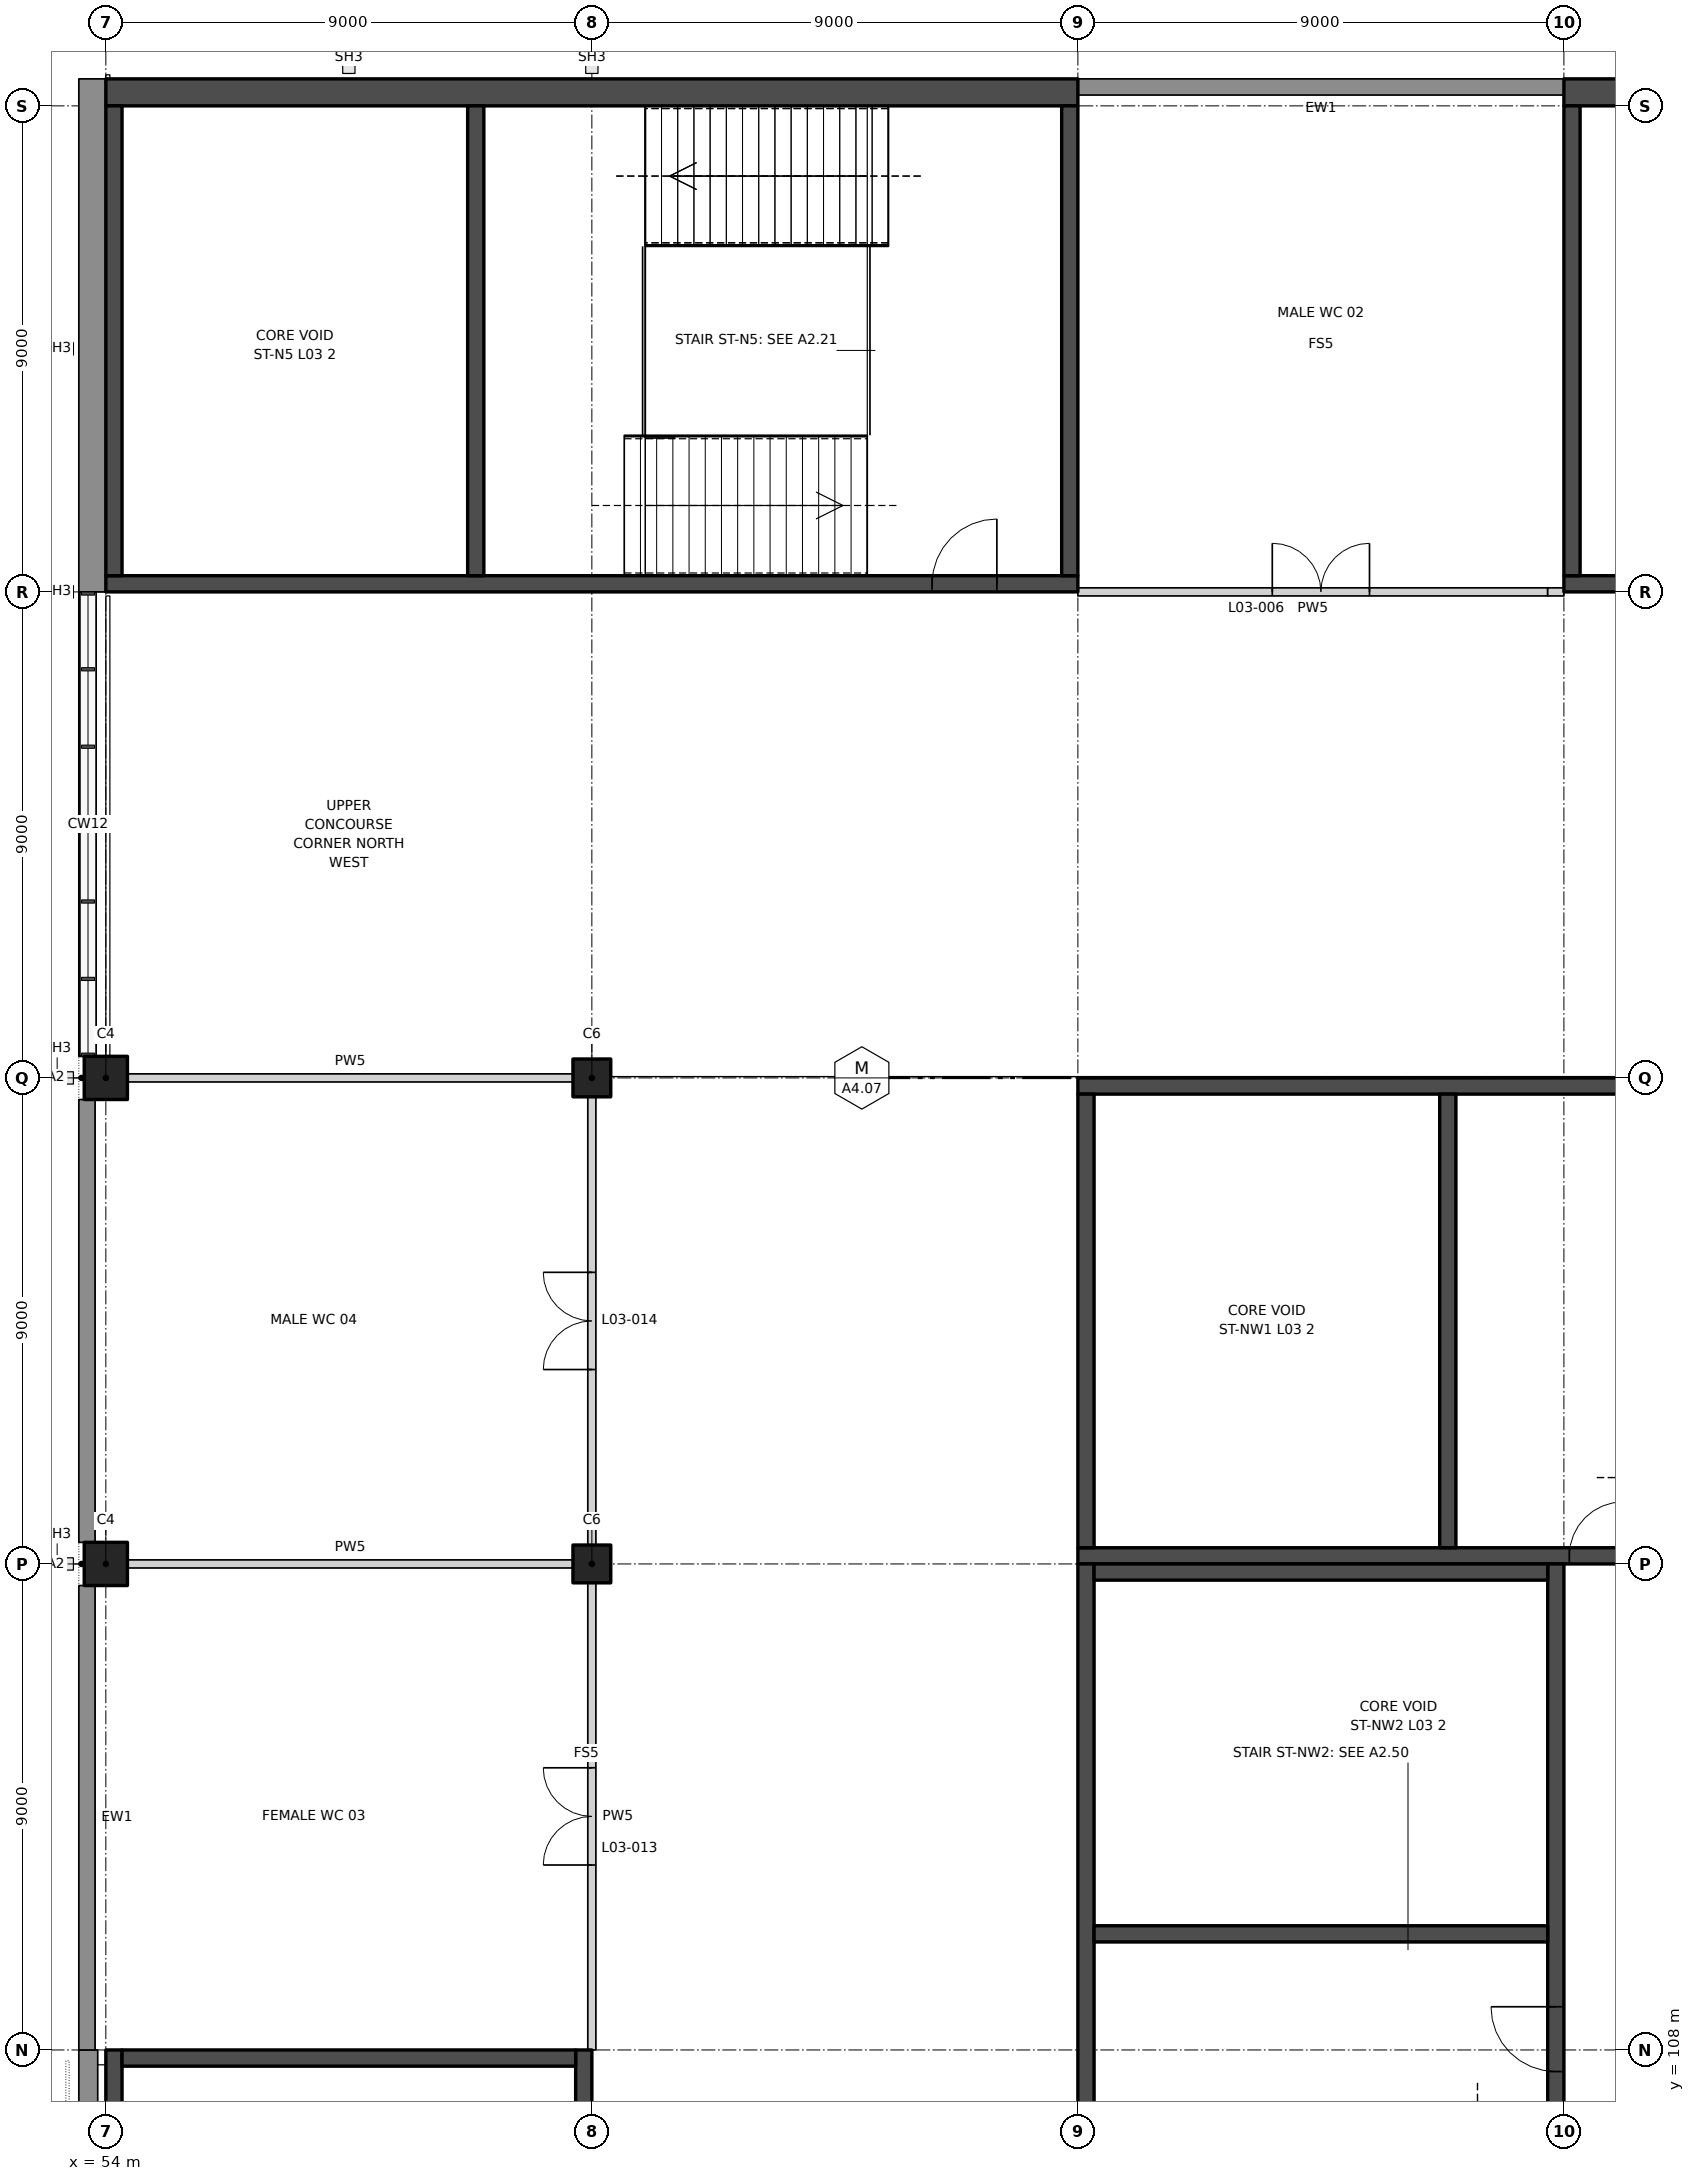
"""IFC4 building model, lengths in metres.
Left out: names, types, materials, properties, quantities, classifications, styles, units other than length and angle.
Written with IfcOpenShell. Run it as: python <this file> out.ifc"""

import sys

from ifc_helpers import new_model, si_unit, direction, frame, frame_2d, origin, origin_2d, place, context, subcontext, project, spatial, rectangle, extrude, element, fill, save


model = new_model("IFC4")
c1 = context("Model", 3, precision=1e-05, world=origin(), true_north=direction((0.0, 1.0)))
c2 = subcontext(c1, "Body", "Model", "MODEL_VIEW")
j1 = project(units=[si_unit("LENGTHUNIT", "METRE"), si_unit("PLANEANGLEUNIT", "RADIAN")], contexts=[c1])
p1 = place(None, origin())
s1 = spatial("IfcSite", under=j1, at=p1, CompositionType="ELEMENT")
p2 = place(p1, origin())
s2 = spatial("IfcBuilding", under=s1, at=p2, CompositionType="ELEMENT")
p3 = place(p2, frame((0.0, 0.0, 22.0)))
s3 = spatial("IfcBuildingStorey", under=s2, at=p3, CompositionType="ELEMENT", Elevation=22.0)
for number, where, z_axis, x_axis in (
    (1, (54.0, 117.0, 0.0), (0.0, 0.0, 1.0), (1.0, 0.0, 0.0)),
    (2, (54.0, 126.0, 0.0), (0.0, 0.0, 1.0), (1.0, 0.0, 0.0)),
):
    element("IfcColumn", number, at=place(p3, frame(where, z_axis=z_axis, x_axis=x_axis)), inside=s3, PredefinedType="COLUMN", context=c2, shape_type="SweptSolid", body=[
        extrude(rectangle(XDim=0.8, YDim=0.8, at=origin_2d()), origin(), (0.0, 0.0, 1.0), 6.0),
    ])
for number, where, z_axis, x_axis in (
    (3, (63.0, 117.0, 0.0), (0.0, 0.0, 1.0), (1.0, 0.0, 0.0)),
    (4, (63.0, 126.0, 0.0), (0.0, 0.0, 1.0), (1.0, 0.0, 0.0)),
):
    element("IfcColumn", number, at=place(p3, frame(where, z_axis=z_axis, x_axis=x_axis)), inside=s3, PredefinedType="COLUMN", context=c2, shape_type="SweptSolid", body=[
        extrude(rectangle(XDim=0.7, YDim=0.7, at=origin_2d()), origin(), (0.0, 0.0, 1.0), 6.0),
    ])
for number, where, z_axis, x_axis in (
    (5, (54.4, 117.0, 0.0), (0.0, 0.0, 1.0), (1.0, 0.0, 0.0)),
    (6, (54.4, 126.0, 0.0), (0.0, 0.0, 1.0), (1.0, 0.0, 0.0)),
):
    element("IfcWall", number, at=place(p3, frame(where, z_axis=z_axis, x_axis=x_axis)), inside=s3, PredefinedType="PARTITIONING", context=c2, shape_type="SweptSolid", body=[
        extrude(rectangle(XDim=8.25, YDim=0.15, at=frame_2d((4.125, 0.0))), origin(), (0.0, 0.0, 1.0), 4.8),
    ])
p4 = place(p3, frame((72.0, 135.0, 0.0), z_axis=(0.0, 0.0, 1.0), x_axis=(1.0, 0.0, 0.0)))
e7 = element("IfcWall", 7, at=p4, inside=s3, PredefinedType="PARTITIONING", context=c2, shape_type="SweptSolid", body=[
    extrude(rectangle(XDim=8.7, YDim=0.15, at=frame_2d((4.35, 0.0))), origin(), (0.0, 0.0, 1.0), 4.7),
])
p5 = place(p4, frame((3.6, 0.0, 0.0)))
e8 = element("IfcOpeningElement", 8, at=p5, cuts=e7, PredefinedType="OPENING", context=c2, shape_type="SweptSolid", body=[
    extrude(rectangle(XDim=1.8, YDim=2.1, at=frame_2d((0.9, 1.05))), frame((0.0, 0.085, 0.0), z_axis=(0.0, -1.0, 0.0), x_axis=(1.0, 0.0, 0.0)), (0.0, 0.0, 1.0), 0.17),
])
p6 = place(p3, frame((63.0, 108.0, 0.0), z_axis=(0.0, 0.0, 1.0), x_axis=(0.0, 1.0, 0.0)))
e9 = element("IfcWall", 9, at=p6, inside=s3, PredefinedType="PARTITIONING", context=c2, shape_type="SweptSolid", body=[
    extrude(rectangle(XDim=8.65, YDim=0.15, at=frame_2d((4.325, 0.0))), origin(), (0.0, 0.0, 1.0), 4.7),
])
p7 = place(p6, frame((3.425, 0.0, 0.0)))
e10 = element("IfcOpeningElement", 10, at=p7, cuts=e9, PredefinedType="OPENING", context=c2, shape_type="SweptSolid", body=[
    extrude(rectangle(XDim=1.8, YDim=2.1, at=frame_2d((0.9, 1.05))), frame((0.0, 0.085, 0.0), z_axis=(0.0, -1.0, 0.0), x_axis=(1.0, 0.0, 0.0)), (0.0, 0.0, 1.0), 0.17),
])
p8 = place(p3, frame((63.0, 117.35, 0.0), z_axis=(0.0, 0.0, 1.0), x_axis=(0.0, 1.0, 0.0)))
e11 = element("IfcWall", 11, at=p8, inside=s3, PredefinedType="PARTITIONING", context=c2, shape_type="SweptSolid", body=[
    extrude(rectangle(XDim=8.3, YDim=0.15, at=frame_2d((4.15, 0.0))), origin(), (0.0, 0.0, 1.0), 4.8),
])
p9 = place(p8, frame((3.25, 0.0, 0.0)))
e12 = element("IfcOpeningElement", 12, at=p9, cuts=e11, PredefinedType="OPENING", context=c2, shape_type="SweptSolid", body=[
    extrude(rectangle(XDim=1.8, YDim=2.1, at=frame_2d((0.9, 1.05))), frame((0.0, 0.085, 0.0), z_axis=(0.0, -1.0, 0.0), x_axis=(1.0, 0.0, 0.0)), (0.0, 0.0, 1.0), 0.17),
])
p10 = place(p3, frame((81.0, 144.35, 0.0), z_axis=(0.0, 0.0, 1.0), x_axis=(-1.0, 0.0, 0.0)))
e13 = element("IfcWall", 13, at=p10, inside=s3, PredefinedType="SOLIDWALL", context=c2, shape_type="SweptSolid", body=[
    extrude(rectangle(XDim=9.0, YDim=0.3, at=frame_2d((4.5, 0.0))), origin(), (0.0, 0.0, 1.0), 6.0),
])
p11 = place(p3, frame((53.675, 108.0, 0.0), z_axis=(0.0, 0.0, 1.0), x_axis=(0.0, -1.0, 0.0)))
e14 = element("IfcWall", 14, at=p11, inside=s3, PredefinedType="SOLIDWALL", context=c2, shape_type="SweptSolid", body=[
    extrude(rectangle(XDim=9.0, YDim=0.35, at=frame_2d((4.5, 0.0))), origin(), (0.0, 0.0, 1.0), 6.0),
])
p12 = place(p3, frame((53.65, 116.6, 0.0), z_axis=(0.0, 0.0, 1.0), x_axis=(0.0, -1.0, 0.0)))
e15 = element("IfcWall", 15, at=p12, inside=s3, PredefinedType="SOLIDWALL", context=c2, shape_type="SweptSolid", body=[
    extrude(rectangle(XDim=8.6, YDim=0.3, at=frame_2d((4.3, 0.0))), origin(), (0.0, 0.0, 1.0), 6.0),
])
p13 = place(p3, frame((53.65, 125.6, 0.0), z_axis=(0.0, 0.0, 1.0), x_axis=(0.0, -1.0, 0.0)))
e16 = element("IfcWall", 16, at=p13, inside=s3, PredefinedType="SOLIDWALL", context=c2, shape_type="SweptSolid", body=[
    extrude(rectangle(XDim=8.2, YDim=0.3, at=frame_2d((4.1, 0.0))), origin(), (0.0, 0.0, 1.0), 6.0),
])
p14 = place(p3, frame((53.65, 135.0, 0.0), z_axis=(0.0, 0.0, 1.0), x_axis=(0.0, -1.0, 0.0)))
e17 = element("IfcWall", 17, at=p14, inside=s3, PredefinedType="SOLIDWALL", context=c2, shape_type="SweptSolid", body=[
    extrude(rectangle(XDim=8.6, YDim=0.3, at=frame_2d((4.3, 0.0))), origin(), (0.0, 0.0, 1.0), 1.0),
])
p15 = place(p3, frame((53.75, 144.5, 0.0), z_axis=(0.0, 0.0, 1.0), x_axis=(0.0, -1.0, 0.0)))
e18 = element("IfcWall", 18, at=p15, inside=s3, PredefinedType="SOLIDWALL", context=c2, shape_type="SweptSolid", body=[
    extrude(rectangle(XDim=9.5, YDim=0.5, at=frame_2d((4.75, 0.0))), origin(), (0.0, 0.0, 1.0), 6.0),
])
p16 = place(p3, frame((81.0, 135.15, 0.0), z_axis=(0.0, 0.0, 1.0), x_axis=(1.0, 0.0, 0.0)))
e19 = element("IfcWall", 19, at=p16, inside=s3, PredefinedType="SHEAR", context=c2, shape_type="SweptSolid", body=[
    extrude(rectangle(XDim=18.0, YDim=0.3, at=frame_2d((9.0, 0.0))), origin(), (0.0, 0.0, 1.0), 6.0),
])
p17 = place(p16, frame((1.5, 0.0, 0.0)))
e20 = element("IfcOpeningElement", 20, at=p17, cuts=e19, PredefinedType="OPENING", context=c2, shape_type="SweptSolid", body=[
    extrude(rectangle(XDim=1.2, YDim=2.1, at=frame_2d((0.6, 1.05))), frame((0.0, 0.16, 0.0), z_axis=(0.0, -1.0, 0.0), x_axis=(1.0, 0.0, 0.0)), (0.0, 0.0, 1.0), 0.32),
])
p18 = place(p3, frame((81.0, 144.25, 0.0), z_axis=(0.0, 0.0, 1.0), x_axis=(1.0, 0.0, 0.0)))
e21 = element("IfcWall", 21, at=p18, inside=s3, PredefinedType="SHEAR", context=c2, shape_type="SweptSolid", body=[
    extrude(rectangle(XDim=18.0, YDim=0.5, at=frame_2d((9.0, 0.0))), origin(), (0.0, 0.0, 1.0), 6.0),
])
p19 = place(p3, frame((81.15, 135.3, 0.0), z_axis=(0.0, 0.0, 1.0), x_axis=(0.0, 1.0, 0.0)))
e22 = element("IfcWall", 22, at=p19, inside=s3, PredefinedType="SHEAR", context=c2, shape_type="SweptSolid", body=[
    extrude(rectangle(XDim=8.7, YDim=0.3, at=frame_2d((4.35, 0.0))), origin(), (0.0, 0.0, 1.0), 6.0),
])
p20 = place(p3, frame((72.0, 135.15, 0.0), z_axis=(0.0, 0.0, 1.0), x_axis=(-1.0, 0.0, 0.0)))
e23 = element("IfcWall", 23, at=p20, inside=s3, PredefinedType="SHEAR", context=c2, shape_type="SweptSolid", body=[
    extrude(rectangle(XDim=18.0, YDim=0.3, at=frame_2d((9.0, 0.0))), origin(), (0.0, 0.0, 1.0), 6.0),
])
p21 = place(p20, frame((1.5, 0.0, 0.0)))
e24 = element("IfcOpeningElement", 24, at=p21, cuts=e23, PredefinedType="OPENING", context=c2, shape_type="SweptSolid", body=[
    extrude(rectangle(XDim=1.2, YDim=2.1, at=frame_2d((0.6, 1.05))), frame((0.0, 0.16, 0.0), z_axis=(0.0, -1.0, 0.0), x_axis=(1.0, 0.0, 0.0)), (0.0, 0.0, 1.0), 0.32),
])
p22 = place(p3, frame((72.0, 144.25, 0.0), z_axis=(0.0, 0.0, 1.0), x_axis=(-1.0, 0.0, 0.0)))
e25 = element("IfcWall", 25, at=p22, inside=s3, PredefinedType="SHEAR", context=c2, shape_type="SweptSolid", body=[
    extrude(rectangle(XDim=18.0, YDim=0.5, at=frame_2d((9.0, 0.0))), origin(), (0.0, 0.0, 1.0), 6.0),
])
for number, where, z_axis, x_axis in (
    (26, (71.85, 135.3, 0.0), (0.0, 0.0, 1.0), (0.0, 1.0, 0.0)),
    (27, (54.15, 135.3, 0.0), (0.0, 0.0, 1.0), (0.0, 1.0, 0.0)),
    (28, (60.85, 135.3, 0.0), (0.0, 0.0, 1.0), (0.0, 1.0, 0.0)),
):
    element("IfcWall", number, at=place(p3, frame(where, z_axis=z_axis, x_axis=x_axis)), inside=s3, PredefinedType="SHEAR", context=c2, shape_type="SweptSolid", body=[
        extrude(rectangle(XDim=8.7, YDim=0.3, at=frame_2d((4.35, 0.0))), origin(), (0.0, 0.0, 1.0), 6.0),
    ])
p23 = place(p3, frame((62.85, 108.0, 0.0), z_axis=(0.0, 0.0, 1.0), x_axis=(0.0, -1.0, 0.0)))
e29 = element("IfcWall", 29, at=p23, inside=s3, PredefinedType="SHEAR", context=c2, shape_type="SweptSolid", body=[
    extrude(rectangle(XDim=18.0, YDim=0.3, at=frame_2d((9.0, 0.0))), origin(), (0.0, 0.0, 1.0), 6.0),
])
p24 = place(p23, frame((8.6, 0.0, 0.0)))
e30 = element("IfcOpeningElement", 30, at=p24, cuts=e29, PredefinedType="OPENING", context=c2, shape_type="SweptSolid", body=[
    extrude(rectangle(XDim=1.2, YDim=2.1, at=frame_2d((0.6, 1.05))), frame((0.0, 0.16, 0.0), z_axis=(0.0, -1.0, 0.0), x_axis=(1.0, 0.0, 0.0)), (0.0, 0.0, 1.0), 0.32),
])
p25 = place(p3, frame((54.15, 108.0, 0.0), z_axis=(0.0, 0.0, 1.0), x_axis=(0.0, -1.0, 0.0)))
e31 = element("IfcWall", 31, at=p25, inside=s3, PredefinedType="SHEAR", context=c2, shape_type="SweptSolid", body=[
    extrude(rectangle(XDim=18.0, YDim=0.3, at=frame_2d((9.0, 0.0))), origin(), (0.0, 0.0, 1.0), 6.0),
])
p26 = place(p3, frame((62.7, 107.85, 0.0), z_axis=(0.0, 0.0, 1.0), x_axis=(-1.0, 0.0, 0.0)))
e32 = element("IfcWall", 32, at=p26, inside=s3, PredefinedType="SHEAR", context=c2, shape_type="SweptSolid", body=[
    extrude(rectangle(XDim=8.4, YDim=0.3, at=frame_2d((4.2, 0.0))), origin(), (0.0, 0.0, 1.0), 6.0),
])
p27 = place(p3, frame((90.25, 117.15, 0.0), z_axis=(0.0, 0.0, 1.0), x_axis=(-1.0, 0.0, 0.0)))
e33 = element("IfcWall", 33, at=p27, inside=s3, PredefinedType="SHEAR", context=c2, shape_type="SweptSolid", body=[
    extrude(rectangle(XDim=18.25, YDim=0.3, at=frame_2d((9.125, 0.0))), origin(), (0.0, 0.0, 1.0), 6.0),
])
p28 = place(p27, frame((8.15, 0.0, 0.0)))
e34 = element("IfcOpeningElement", 34, at=p28, cuts=e33, PredefinedType="OPENING", context=c2, shape_type="SweptSolid", body=[
    extrude(rectangle(XDim=1.0, YDim=2.1, at=frame_2d((0.5, 1.05))), frame((0.0, 0.16, 0.0), z_axis=(0.0, -1.0, 0.0), x_axis=(1.0, 0.0, 0.0)), (0.0, 0.0, 1.0), 0.32),
])
p29 = place(p3, frame((90.0, 125.85, 0.0), z_axis=(0.0, 0.0, 1.0), x_axis=(-1.0, 0.0, 0.0)))
e35 = element("IfcWall", 35, at=p29, inside=s3, PredefinedType="SHEAR", context=c2, shape_type="SweptSolid", body=[
    extrude(rectangle(XDim=18.0, YDim=0.3, at=frame_2d((9.0, 0.0))), origin(), (0.0, 0.0, 1.0), 6.0),
])
for number, where, z_axis, x_axis in (
    (36, (72.15, 117.3, 0.0), (0.0, 0.0, 1.0), (0.0, 1.0, 0.0)),
    (37, (78.85, 117.3, 0.0), (0.0, 0.0, 1.0), (0.0, 1.0, 0.0)),
):
    element("IfcWall", number, at=place(p3, frame(where, z_axis=z_axis, x_axis=x_axis)), inside=s3, PredefinedType="SHEAR", context=c2, shape_type="SweptSolid", body=[
        extrude(rectangle(XDim=8.4, YDim=0.3, at=frame_2d((4.2, 0.0))), origin(), (0.0, 0.0, 1.0), 6.0),
    ])
p30 = place(p3, frame((80.85, 99.0, 0.0), z_axis=(0.0, 0.0, 1.0), x_axis=(0.0, 1.0, 0.0)))
e38 = element("IfcWall", 38, at=p30, inside=s3, PredefinedType="SHEAR", context=c2, shape_type="SweptSolid", body=[
    extrude(rectangle(XDim=18.0, YDim=0.3, at=frame_2d((9.0, 0.0))), origin(), (0.0, 0.0, 1.0), 6.0),
])
p31 = place(p30, frame((8.6, 0.0, 0.0)))
e39 = element("IfcOpeningElement", 39, at=p31, cuts=e38, PredefinedType="OPENING", context=c2, shape_type="SweptSolid", body=[
    extrude(rectangle(XDim=1.2, YDim=2.1, at=frame_2d((0.6, 1.05))), frame((0.0, 0.16, 0.0), z_axis=(0.0, -1.0, 0.0), x_axis=(1.0, 0.0, 0.0)), (0.0, 0.0, 1.0), 0.32),
])
p32 = place(p3, frame((72.15, 99.0, 0.0), z_axis=(0.0, 0.0, 1.0), x_axis=(0.0, 1.0, 0.0)))
e40 = element("IfcWall", 40, at=p32, inside=s3, PredefinedType="SHEAR", context=c2, shape_type="SweptSolid", body=[
    extrude(rectangle(XDim=18.0, YDim=0.3, at=frame_2d((9.0, 0.0))), origin(), (0.0, 0.0, 1.0), 6.0),
])
for number, where, z_axis, x_axis in (
    (41, (80.7, 116.85, 0.0), (0.0, 0.0, 1.0), (-1.0, 0.0, 0.0)),
    (42, (80.7, 110.15, 0.0), (0.0, 0.0, 1.0), (-1.0, 0.0, 0.0)),
):
    element("IfcWall", number, at=place(p3, frame(where, z_axis=z_axis, x_axis=x_axis)), inside=s3, PredefinedType="SHEAR", context=c2, shape_type="SweptSolid", body=[
        extrude(rectangle(XDim=8.4, YDim=0.3, at=frame_2d((4.2, 0.0))), origin(), (0.0, 0.0, 1.0), 6.0),
    ])
p33 = place(p3, frame((80.7, 135.0, 0.0), z_axis=(0.0, 0.0, 1.0), x_axis=(1.0, 0.0, 0.0)))
e43 = element("IfcWall", 43, at=p33, inside=s3, PredefinedType="PARTITIONING", context=c2, shape_type="SweptSolid", body=[
    extrude(rectangle(XDim=0.3, YDim=0.15, at=frame_2d((0.15, 0.0))), origin(), (0.0, 0.0, 1.0), 6.0),
])
p34 = place(p5, origin())
e44 = element("IfcDoor", 44, at=p34, inside=s3, OperationType="DOUBLE_DOOR_DOUBLE_SWING", PredefinedType="DOOR", context=c2, shape_type="SweptSolid", body=[
    extrude(rectangle(XDim=1.8, YDim=2.1, at=frame_2d((0.9, 1.05))), frame((0.0, 0.025, 0.0), z_axis=(0.0, -1.0, 0.0), x_axis=(1.0, 0.0, 0.0)), (0.0, 0.0, 1.0), 0.05),
])
fill(e8, e44)
p35 = place(p7, origin())
e45 = element("IfcDoor", 45, at=p35, inside=s3, OperationType="DOUBLE_DOOR_DOUBLE_SWING", PredefinedType="DOOR", context=c2, shape_type="SweptSolid", body=[
    extrude(rectangle(XDim=1.8, YDim=2.1, at=frame_2d((0.9, 1.05))), frame((0.0, 0.025, 0.0), z_axis=(0.0, -1.0, 0.0), x_axis=(1.0, 0.0, 0.0)), (0.0, 0.0, 1.0), 0.05),
])
fill(e10, e45)
p36 = place(p9, origin())
e46 = element("IfcDoor", 46, at=p36, inside=s3, OperationType="DOUBLE_DOOR_DOUBLE_SWING", PredefinedType="DOOR", context=c2, shape_type="SweptSolid", body=[
    extrude(rectangle(XDim=1.8, YDim=2.1, at=frame_2d((0.9, 1.05))), frame((0.0, 0.025, 0.0), z_axis=(0.0, -1.0, 0.0), x_axis=(1.0, 0.0, 0.0)), (0.0, 0.0, 1.0), 0.05),
])
fill(e12, e46)
p37 = place(p21, frame((1.2, 0.0, 0.0), z_axis=(0.0, 0.0, 1.0), x_axis=(-1.0, 0.0, 0.0)))
e47 = element("IfcDoor", 47, at=p37, inside=s3, OperationType="SINGLE_SWING_RIGHT", PredefinedType="DOOR", context=c2, shape_type="SweptSolid", body=[
    extrude(rectangle(XDim=1.2, YDim=2.1, at=frame_2d((0.6, 1.05))), frame((0.0, 0.025, 0.0), z_axis=(0.0, -1.0, 0.0), x_axis=(1.0, 0.0, 0.0)), (0.0, 0.0, 1.0), 0.05),
])
fill(e24, e47)
p38 = place(p28, frame((1.0, 0.0, 0.0), z_axis=(0.0, 0.0, 1.0), x_axis=(-1.0, 0.0, 0.0)))
e48 = element("IfcDoor", 48, at=p38, inside=s3, OperationType="SINGLE_SWING_RIGHT", PredefinedType="DOOR", context=c2, shape_type="SweptSolid", body=[
    extrude(rectangle(XDim=1.0, YDim=2.1, at=frame_2d((0.5, 1.05))), frame((0.0, 0.025, 0.0), z_axis=(0.0, -1.0, 0.0), x_axis=(1.0, 0.0, 0.0)), (0.0, 0.0, 1.0), 0.05),
])
fill(e34, e48)
p39 = place(p31, origin())
e49 = element("IfcDoor", 49, at=p39, inside=s3, OperationType="SINGLE_SWING_RIGHT", PredefinedType="DOOR", context=c2, shape_type="SweptSolid", body=[
    extrude(rectangle(XDim=1.2, YDim=2.1, at=frame_2d((0.6, 1.05))), frame((0.0, 0.025, 0.0), z_axis=(0.0, -1.0, 0.0), x_axis=(1.0, 0.0, 0.0)), (0.0, 0.0, 1.0), 0.05),
])
fill(e39, e49)
save(model, sys.argv[1])
